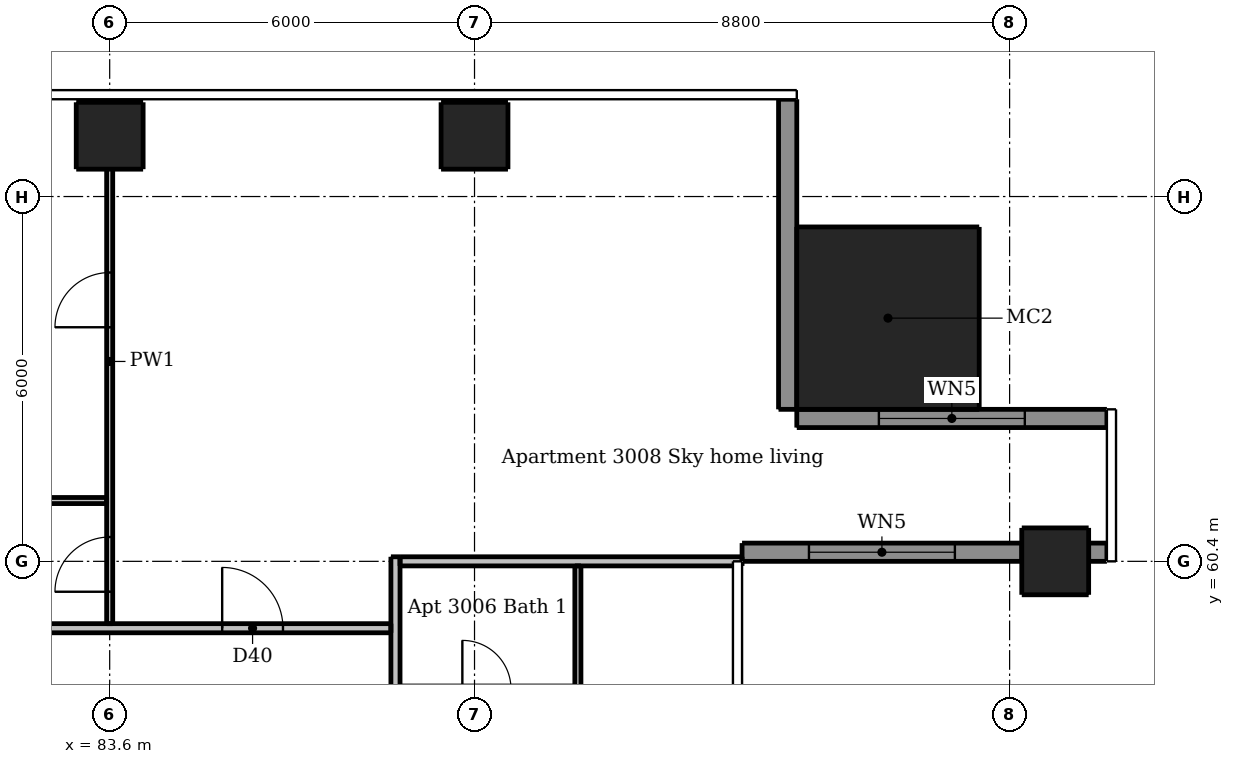
"""IFC4 building model, lengths in metres.
Left out: names, types, materials, properties, quantities, classifications, styles, units other than length and angle.
Written with IfcOpenShell. Run it as: python <this file> out.ifc"""

import sys

from ifc_helpers import new_model, si_unit, direction, frame, frame_2d, origin, origin_2d, place, context, subcontext, project, spatial, rectangle, extrude, element, fill, save


model = new_model("IFC4")
c1 = context("Model", 3, precision=1e-05, world=origin(), true_north=direction((0.0, 1.0)))
c2 = subcontext(c1, "Body", "Model", "MODEL_VIEW")
j1 = project(units=[si_unit("LENGTHUNIT", "METRE"), si_unit("PLANEANGLEUNIT", "RADIAN")], contexts=[c1])
p1 = place(None, origin())
s1 = spatial("IfcSite", under=j1, at=p1, CompositionType="ELEMENT")
p2 = place(p1, origin())
s2 = spatial("IfcBuilding", under=s1, at=p2, CompositionType="ELEMENT")
p3 = place(p2, frame((0.0, 0.0, 111.7)))
s3 = spatial("IfcBuildingStorey", under=s2, at=p3, CompositionType="ELEMENT", Elevation=111.7)
for number, where, z_axis, x_axis in (
    (1, (99.15, 60.4, 0.0), (0.0, 0.0, 1.0), (1.0, 0.0, 0.0)),
    (2, (83.6, 67.4, 0.0), (0.0, 0.0, 1.0), (1.0, 0.0, 0.0)),
    (3, (89.6, 67.4, 0.0), (0.0, 0.0, 1.0), (1.0, 0.0, 0.0)),
):
    element("IfcColumn", number, at=place(p3, frame(where, z_axis=z_axis, x_axis=x_axis)), inside=s3, PredefinedType="COLUMN", context=c2, shape_type="SweptSolid", body=[
        extrude(rectangle(XDim=1.1, YDim=1.1, at=origin_2d()), origin(), (0.0, 0.0, 1.0), 3.05),
    ])
p4 = place(p3, frame((96.4, 64.4, 0.0), z_axis=(0.0, 0.0, 1.0), x_axis=(1.0, 0.0, 0.0)))
e4 = element("IfcColumn", 4, at=p4, inside=s3, PredefinedType="COLUMN", context=c2, shape_type="SweptSolid", body=[
    extrude(rectangle(XDim=3.0, YDim=3.0, at=origin_2d()), origin(), (0.0, 0.0, 1.0), 3.3),
])
p5 = place(p3, frame((94.0, 60.55, 0.0), z_axis=(0.0, 0.0, 1.0), x_axis=(1.0, 0.0, 0.0)))
e5 = element("IfcWall", 5, at=p5, inside=s3, PredefinedType="SOLIDWALL", context=c2, shape_type="SweptSolid", body=[
    extrude(rectangle(XDim=4.6, YDim=0.3, at=frame_2d((2.3, 0.0))), origin(), (0.0, 0.0, 1.0), 3.05),
])
p6 = place(p5, frame((1.1, 0.0, 0.15)))
e6 = element("IfcOpeningElement", 6, at=p6, cuts=e5, PredefinedType="OPENING", context=c2, shape_type="SweptSolid", body=[
    extrude(rectangle(XDim=2.4, YDim=2.1, at=frame_2d((1.2, 1.05))), frame((0.0, 0.16, 0.0), z_axis=(0.0, -1.0, 0.0), x_axis=(1.0, 0.0, 0.0)), (0.0, 0.0, 1.0), 0.32),
])
p7 = place(p3, frame((99.7, 60.55, 0.0), z_axis=(0.0, 0.0, 1.0), x_axis=(1.0, 0.0, 0.0)))
e7 = element("IfcWall", 7, at=p7, inside=s3, PredefinedType="SOLIDWALL", context=c2, shape_type="SweptSolid", body=[
    extrude(rectangle(XDim=0.3, YDim=0.3, at=frame_2d((0.15, 0.0))), origin(), (0.0, 0.0, 1.0), 3.05),
])
p8 = place(p3, frame((100.0, 62.75, 0.0), z_axis=(0.0, 0.0, 1.0), x_axis=(-1.0, 0.0, 0.0)))
e8 = element("IfcWall", 8, at=p8, inside=s3, PredefinedType="SOLIDWALL", context=c2, shape_type="SweptSolid", body=[
    extrude(rectangle(XDim=5.1, YDim=0.3, at=frame_2d((2.55, 0.0))), origin(), (0.0, 0.0, 1.0), 3.05),
])
p9 = place(p8, frame((1.35, 0.0, 0.15)))
e9 = element("IfcOpeningElement", 9, at=p9, cuts=e8, PredefinedType="OPENING", context=c2, shape_type="SweptSolid", body=[
    extrude(rectangle(XDim=2.4, YDim=2.1, at=frame_2d((1.2, 1.05))), frame((0.0, 0.16, 0.0), z_axis=(0.0, -1.0, 0.0), x_axis=(1.0, 0.0, 0.0)), (0.0, 0.0, 1.0), 0.32),
])
p10 = place(p3, frame((94.75, 62.9, 0.0), z_axis=(0.0, 0.0, 1.0), x_axis=(0.0, 1.0, 0.0)))
e10 = element("IfcWall", 10, at=p10, inside=s3, PredefinedType="SOLIDWALL", context=c2, shape_type="SweptSolid", body=[
    extrude(rectangle(XDim=5.1, YDim=0.3, at=frame_2d((2.55, 0.0))), origin(), (0.0, 0.0, 1.0), 3.05),
])
p11 = place(p3, frame((83.6, 59.375, 0.0), z_axis=(0.0, 0.0, 1.0), x_axis=(0.0, 1.0, 0.0)))
e11 = element("IfcWall", 11, at=p11, inside=s3, PredefinedType="PARTITIONING", context=c2, shape_type="SweptSolid", body=[
    extrude(rectangle(XDim=8.625, YDim=0.1, at=frame_2d((4.312, 0.0))), origin(), (0.0, 0.0, 1.0), 2.516),
])
p12 = place(p11, frame((0.525, 0.0, 0.0)))
e12 = element("IfcOpeningElement", 12, at=p12, cuts=e11, PredefinedType="OPENING", context=c2, shape_type="SweptSolid", body=[
    extrude(rectangle(XDim=0.9, YDim=2.1, at=frame_2d((0.45, 1.05))), frame((0.0, 0.06, 0.0), z_axis=(0.0, -1.0, 0.0), x_axis=(1.0, 0.0, 0.0)), (0.0, 0.0, 1.0), 0.12),
])
p13 = place(p11, frame((4.875, 0.0, 0.0)))
e13 = element("IfcOpeningElement", 13, at=p13, cuts=e11, PredefinedType="OPENING", context=c2, shape_type="SweptSolid", body=[
    extrude(rectangle(XDim=0.9, YDim=2.1, at=frame_2d((0.45, 1.05))), frame((0.0, 0.06, 0.0), z_axis=(0.0, -1.0, 0.0), x_axis=(1.0, 0.0, 0.0)), (0.0, 0.0, 1.0), 0.12),
])
p14 = place(p3, frame((91.3, 58.25, 0.0), z_axis=(0.0, 0.0, 1.0), x_axis=(0.0, 1.0, 0.0)))
e14 = element("IfcWall", 14, at=p14, inside=s3, PredefinedType="PARTITIONING", context=c2, shape_type="SweptSolid", body=[
    extrude(rectangle(XDim=2.075, YDim=0.1, at=frame_2d((1.038, 0.0))), origin(), (0.0, 0.0, 1.0), 3.05),
])
p15 = place(p3, frame((83.55, 61.4, 0.0), z_axis=(0.0, 0.0, 1.0), x_axis=(-1.0, 0.0, 0.0)))
e15 = element("IfcWall", 15, at=p15, inside=s3, PredefinedType="PARTITIONING", context=c2, shape_type="SweptSolid", body=[
    extrude(rectangle(XDim=5.875, YDim=0.1, at=frame_2d((2.938, 0.0))), origin(), (0.0, 0.0, 1.0), 3.05),
])
p16 = place(p15, frame((3.75, 0.0, 0.0)))
e16 = element("IfcOpeningElement", 16, at=p16, cuts=e15, PredefinedType="OPENING", context=c2, shape_type="SweptSolid", body=[
    extrude(rectangle(XDim=0.8, YDim=2.1, at=frame_2d((0.4, 1.05))), frame((0.0, 0.06, 0.0), z_axis=(0.0, -1.0, 0.0), x_axis=(1.0, 0.0, 0.0)), (0.0, 0.0, 1.0), 0.12),
])
p17 = place(p3, frame((88.3, 60.475, 0.0), z_axis=(0.0, 0.0, 1.0), x_axis=(0.0, -1.0, 0.0)))
e17 = element("IfcWall", 17, at=p17, inside=s3, PredefinedType="PARTITIONING", context=c2, shape_type="SweptSolid", body=[
    extrude(rectangle(XDim=28.7, YDim=0.15, at=frame_2d((14.35, 0.0))), origin(), (0.0, 0.0, 1.0), 3.05),
])
p18 = place(p17, frame((27.425, 0.0, 0.0)))
e18 = element("IfcOpeningElement", 18, at=p18, cuts=e17, PredefinedType="OPENING", context=c2, shape_type="SweptSolid", body=[
    extrude(rectangle(XDim=1.0, YDim=2.1, at=frame_2d((0.5, 1.05))), frame((0.0, 0.085, 0.0), z_axis=(0.0, -1.0, 0.0), x_axis=(1.0, 0.0, 0.0)), (0.0, 0.0, 1.0), 0.17),
])
p19 = place(p17, frame((14.575, 0.0, 0.0)))
e19 = element("IfcOpeningElement", 19, at=p19, cuts=e17, PredefinedType="OPENING", context=c2, shape_type="SweptSolid", body=[
    extrude(rectangle(XDim=1.0, YDim=2.1, at=frame_2d((0.5, 1.05))), frame((0.0, 0.085, 0.0), z_axis=(0.0, -1.0, 0.0), x_axis=(1.0, 0.0, 0.0)), (0.0, 0.0, 1.0), 0.17),
])
p20 = place(p17, frame((2.575, 0.0, 0.0)))
e20 = element("IfcOpeningElement", 20, at=p20, cuts=e17, PredefinedType="OPENING", context=c2, shape_type="SweptSolid", body=[
    extrude(rectangle(XDim=1.0, YDim=2.1, at=frame_2d((0.5, 1.05))), frame((0.0, 0.085, 0.0), z_axis=(0.0, -1.0, 0.0), x_axis=(1.0, 0.0, 0.0)), (0.0, 0.0, 1.0), 0.17),
])
p21 = place(p3, frame((88.375, 60.4, 0.0), z_axis=(0.0, 0.0, 1.0), x_axis=(1.0, 0.0, 0.0)))
e21 = element("IfcWall", 21, at=p21, inside=s3, PredefinedType="PARTITIONING", context=c2, shape_type="SweptSolid", body=[
    extrude(rectangle(XDim=5.625, YDim=0.15, at=frame_2d((2.812, 0.0))), origin(), (0.0, 0.0, 1.0), 2.516),
])
p22 = place(p3, frame((59.675, 59.3, 0.0), z_axis=(0.0, 0.0, 1.0), x_axis=(1.0, 0.0, 0.0)))
e22 = element("IfcWall", 22, at=p22, inside=s3, PredefinedType="PARTITIONING", context=c2, shape_type="SweptSolid", body=[
    extrude(rectangle(XDim=28.55, YDim=0.15, at=frame_2d((14.275, 0.0))), origin(), (0.0, 0.0, 1.0), 3.05),
])
p23 = place(p22, frame((8.975, 0.0, 0.0)))
e23 = element("IfcOpeningElement", 23, at=p23, cuts=e22, PredefinedType="OPENING", context=c2, shape_type="SweptSolid", body=[
    extrude(rectangle(XDim=1.0, YDim=2.1, at=frame_2d((0.5, 1.05))), frame((0.0, 0.085, 0.0), z_axis=(0.0, -1.0, 0.0), x_axis=(1.0, 0.0, 0.0)), (0.0, 0.0, 1.0), 0.17),
])
p24 = place(p22, frame((25.775, 0.0, 0.0)))
e24 = element("IfcOpeningElement", 24, at=p24, cuts=e22, PredefinedType="OPENING", context=c2, shape_type="SweptSolid", body=[
    extrude(rectangle(XDim=1.0, YDim=2.1, at=frame_2d((0.5, 1.05))), frame((0.0, 0.085, 0.0), z_axis=(0.0, -1.0, 0.0), x_axis=(1.0, 0.0, 0.0)), (0.0, 0.0, 1.0), 0.17),
])
p25 = place(p6, origin())
e25 = element("IfcWindow", 25, at=p25, inside=s3, PartitioningType="DOUBLE_PANEL_VERTICAL", PredefinedType="WINDOW", context=c2, shape_type="SweptSolid", body=[
    extrude(rectangle(XDim=2.4, YDim=2.1, at=frame_2d((1.2, 1.05))), frame((0.0, 0.03, 0.0), z_axis=(0.0, -1.0, 0.0), x_axis=(1.0, 0.0, 0.0)), (0.0, 0.0, 1.0), 0.06),
])
fill(e6, e25)
p26 = place(p9, origin())
e26 = element("IfcWindow", 26, at=p26, inside=s3, PartitioningType="DOUBLE_PANEL_VERTICAL", PredefinedType="WINDOW", context=c2, shape_type="SweptSolid", body=[
    extrude(rectangle(XDim=2.4, YDim=2.1, at=frame_2d((1.2, 1.05))), frame((0.0, 0.03, 0.0), z_axis=(0.0, -1.0, 0.0), x_axis=(1.0, 0.0, 0.0)), (0.0, 0.0, 1.0), 0.06),
])
fill(e9, e26)
p27 = place(p24, origin())
e27 = element("IfcDoor", 27, at=p27, inside=s3, OperationType="SINGLE_SWING_LEFT", PredefinedType="DOOR", context=c2, shape_type="SweptSolid", body=[
    extrude(rectangle(XDim=1.0, YDim=2.1, at=frame_2d((0.5, 1.05))), frame((0.0, 0.025, 0.0), z_axis=(0.0, -1.0, 0.0), x_axis=(1.0, 0.0, 0.0)), (0.0, 0.0, 1.0), 0.05),
])
fill(e24, e27)
p28 = place(p12, origin())
e28 = element("IfcDoor", 28, at=p28, inside=s3, OperationType="SINGLE_SWING_LEFT", PredefinedType="DOOR", context=c2, shape_type="SweptSolid", body=[
    extrude(rectangle(XDim=0.9, YDim=2.1, at=frame_2d((0.45, 1.05))), frame((0.0, 0.025, 0.0), z_axis=(0.0, -1.0, 0.0), x_axis=(1.0, 0.0, 0.0)), (0.0, 0.0, 1.0), 0.05),
])
fill(e12, e28)
p29 = place(p13, origin())
e29 = element("IfcDoor", 29, at=p29, inside=s3, OperationType="SINGLE_SWING_LEFT", PredefinedType="DOOR", context=c2, shape_type="SweptSolid", body=[
    extrude(rectangle(XDim=0.9, YDim=2.1, at=frame_2d((0.45, 1.05))), frame((0.0, 0.025, 0.0), z_axis=(0.0, -1.0, 0.0), x_axis=(1.0, 0.0, 0.0)), (0.0, 0.0, 1.0), 0.05),
])
fill(e13, e29)
save(model, sys.argv[1])
